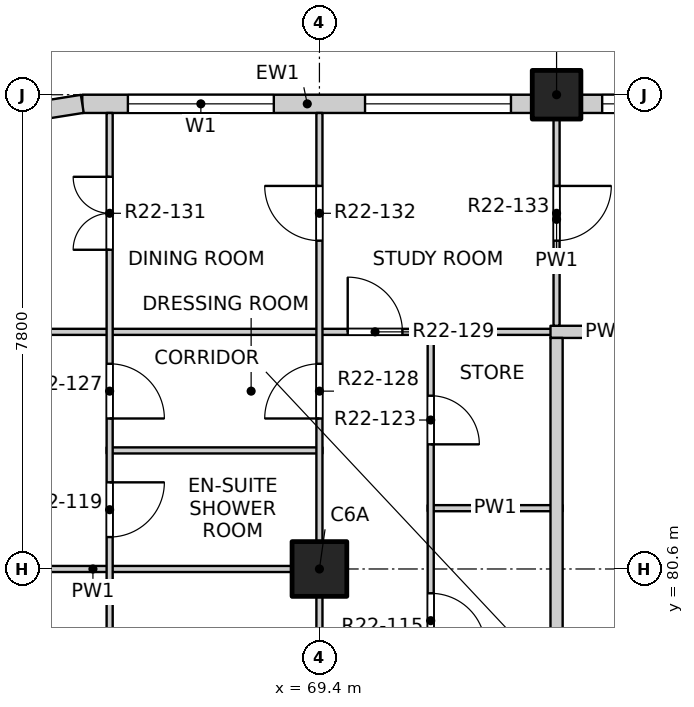
"""IFC4 building model, lengths in metres.
Left out: names, types, materials, properties, quantities, classifications, styles, units other than length and angle.
Written with IfcOpenShell. Run it as: python <this file> out.ifc"""

import sys

from ifc_helpers import new_model, si_unit, direction, frame, frame_2d, origin, origin_2d, place, context, subcontext, project, spatial, rectangle, extrude, element, fill, save


model = new_model("IFC4")
c1 = context("Model", 3, precision=1e-05, world=origin(), true_north=direction((0.0, 1.0)))
c2 = subcontext(c1, "Body", "Model", "MODEL_VIEW")
j1 = project(units=[si_unit("LENGTHUNIT", "METRE"), si_unit("PLANEANGLEUNIT", "RADIAN")], contexts=[c1])
p1 = place(None, origin())
s1 = spatial("IfcSite", under=j1, at=p1, CompositionType="ELEMENT")
p2 = place(p1, origin())
s2 = spatial("IfcBuilding", under=s1, at=p2, CompositionType="ELEMENT")
p3 = place(p2, frame((0.0, 0.0, 224.5)))
s3 = spatial("IfcBuildingStorey", under=s2, at=p3, CompositionType="ELEMENT", Elevation=224.5)
p4 = place(p3, frame((73.3, 88.4, -0.25), z_axis=(0.0, 0.0, 1.0), x_axis=(1.0, 0.0, 0.0)))
e1 = element("IfcColumn", 1, at=p4, inside=s3, PredefinedType="COLUMN", context=c2, shape_type="SweptSolid", body=[
    extrude(rectangle(XDim=0.8, YDim=0.8, at=origin_2d()), origin(), (0.0, 0.0, 1.0), 3.4),
])
p5 = place(p3, frame((69.4, 80.6, -0.25), z_axis=(0.0, 0.0, 1.0), x_axis=(1.0, 0.0, 0.0)))
e2 = element("IfcColumn", 2, at=p5, inside=s3, PredefinedType="COLUMN", context=c2, shape_type="SweptSolid", body=[
    extrude(rectangle(XDim=0.9, YDim=0.9, at=origin_2d()), origin(), (0.0, 0.0, 1.0), 3.4),
])
p6 = place(p3, frame((65.5, 88.25, 0.0), z_axis=(0.0, 0.0, 1.0), x_axis=(1.0, 0.0, 0.0)))
e3 = element("IfcWall", 3, at=p6, inside=s3, PredefinedType="SOLIDWALL", context=c2, shape_type="SweptSolid", body=[
    extrude(rectangle(XDim=7.4, YDim=0.3, at=frame_2d((3.7, 0.0))), origin(), (0.0, 0.0, 1.0), 2.7),
])
p7 = place(p6, frame((0.75, 0.0, 0.9)))
e4 = element("IfcOpeningElement", 4, at=p7, cuts=e3, PredefinedType="OPENING", context=c2, shape_type="SweptSolid", body=[
    extrude(rectangle(XDim=2.4, YDim=1.8, at=frame_2d((1.2, 0.9))), frame((0.0, 0.16, 0.0), z_axis=(0.0, -1.0, 0.0), x_axis=(1.0, 0.0, 0.0)), (0.0, 0.0, 1.0), 0.32),
])
p8 = place(p6, frame((4.65, 0.0, 0.9)))
e5 = element("IfcOpeningElement", 5, at=p8, cuts=e3, PredefinedType="OPENING", context=c2, shape_type="SweptSolid", body=[
    extrude(rectangle(XDim=2.4, YDim=1.8, at=frame_2d((1.2, 0.9))), frame((0.0, 0.16, 0.0), z_axis=(0.0, -1.0, 0.0), x_axis=(1.0, 0.0, 0.0)), (0.0, 0.0, 1.0), 0.32),
])
p9 = place(p3, frame((73.7, 88.25, 0.0), z_axis=(0.0, 0.0, 1.0), x_axis=(1.0, 0.0, 0.0)))
e6 = element("IfcWall", 6, at=p9, inside=s3, PredefinedType="SOLIDWALL", context=c2, shape_type="SweptSolid", body=[
    extrude(rectangle(XDim=22.6, YDim=0.3, at=frame_2d((11.3, 0.0))), origin(), (0.0, 0.0, 1.0), 2.7),
])
p10 = place(p9, frame((0.35, 0.0, 0.9)))
e7 = element("IfcOpeningElement", 7, at=p10, cuts=e6, PredefinedType="OPENING", context=c2, shape_type="SweptSolid", body=[
    extrude(rectangle(XDim=2.4, YDim=1.8, at=frame_2d((1.2, 0.9))), frame((0.0, 0.16, 0.0), z_axis=(0.0, -1.0, 0.0), x_axis=(1.0, 0.0, 0.0)), (0.0, 0.0, 1.0), 0.32),
])
p11 = place(p9, frame((4.25, 0.0, 0.9)))
e8 = element("IfcOpeningElement", 8, at=p11, cuts=e6, PredefinedType="OPENING", context=c2, shape_type="SweptSolid", body=[
    extrude(rectangle(XDim=2.4, YDim=1.8, at=frame_2d((1.2, 0.9))), frame((0.0, 0.16, 0.0), z_axis=(0.0, -1.0, 0.0), x_axis=(1.0, 0.0, 0.0)), (0.0, 0.0, 1.0), 0.32),
])
p12 = place(p9, frame((8.15, 0.0, 0.9)))
e9 = element("IfcOpeningElement", 9, at=p12, cuts=e6, PredefinedType="OPENING", context=c2, shape_type="SweptSolid", body=[
    extrude(rectangle(XDim=2.4, YDim=1.8, at=frame_2d((1.2, 0.9))), frame((0.0, 0.16, 0.0), z_axis=(0.0, -1.0, 0.0), x_axis=(1.0, 0.0, 0.0)), (0.0, 0.0, 1.0), 0.32),
])
p13 = place(p9, frame((12.05, 0.0, 0.9)))
e10 = element("IfcOpeningElement", 10, at=p13, cuts=e6, PredefinedType="OPENING", context=c2, shape_type="SweptSolid", body=[
    extrude(rectangle(XDim=2.4, YDim=1.8, at=frame_2d((1.2, 0.9))), frame((0.0, 0.16, 0.0), z_axis=(0.0, -1.0, 0.0), x_axis=(1.0, 0.0, 0.0)), (0.0, 0.0, 1.0), 0.32),
])
p14 = place(p9, frame((15.95, 0.0, 0.9)))
e11 = element("IfcOpeningElement", 11, at=p14, cuts=e6, PredefinedType="OPENING", context=c2, shape_type="SweptSolid", body=[
    extrude(rectangle(XDim=2.4, YDim=1.8, at=frame_2d((1.2, 0.9))), frame((0.0, 0.16, 0.0), z_axis=(0.0, -1.0, 0.0), x_axis=(1.0, 0.0, 0.0)), (0.0, 0.0, 1.0), 0.32),
])
p15 = place(p9, frame((19.85, 0.0, 0.9)))
e12 = element("IfcOpeningElement", 12, at=p15, cuts=e6, PredefinedType="OPENING", context=c2, shape_type="SweptSolid", body=[
    extrude(rectangle(XDim=2.4, YDim=1.8, at=frame_2d((1.2, 0.9))), frame((0.0, 0.16, 0.0), z_axis=(0.0, -1.0, 0.0), x_axis=(1.0, 0.0, 0.0)), (0.0, 0.0, 1.0), 0.32),
])
p16 = place(p3, frame((65.5, 88.25, 0.0), z_axis=(0.0, 0.0, 1.0), x_axis=(-0.987678452879, -0.156496880861, 0.0)))
e13 = element("IfcWall", 13, at=p16, inside=s3, PredefinedType="SOLIDWALL", context=c2, shape_type="SweptSolid", body=[
    extrude(rectangle(XDim=1.173, YDim=0.3, at=frame_2d((0.586, 0.0))), origin(), (0.0, 0.0, 1.0), 2.7),
])
p17 = place(p3, frame((61.9, 80.6, 0.0), z_axis=(0.0, 0.0, 1.0), x_axis=(1.0, 0.0, 0.0)))
e14 = element("IfcWall", 14, at=p17, inside=s3, PredefinedType="PARTITIONING", context=c2, shape_type="SweptSolid", body=[
    extrude(rectangle(XDim=7.55, YDim=0.1, at=frame_2d((3.775, 0.0))), origin(), (0.0, 0.0, 1.0), 3.15),
])
p18 = place(p3, frame((71.18, 81.6, 0.0), z_axis=(0.0, 0.0, 1.0), x_axis=(1.0, 0.0, 0.0)))
e15 = element("IfcWall", 15, at=p18, inside=s3, PredefinedType="PARTITIONING", context=c2, shape_type="SweptSolid", body=[
    extrude(rectangle(XDim=2.22, YDim=0.1, at=frame_2d((1.11, 0.0))), origin(), (0.0, 0.0, 1.0), 3.15),
])
p19 = place(p3, frame((65.9, 82.55, 0.0), z_axis=(0.0, 0.0, 1.0), x_axis=(1.0, 0.0, 0.0)))
e16 = element("IfcWall", 16, at=p19, inside=s3, PredefinedType="PARTITIONING", context=c2, shape_type="SweptSolid", body=[
    extrude(rectangle(XDim=3.55, YDim=0.1, at=frame_2d((1.775, 0.0))), origin(), (0.0, 0.0, 1.0), 3.15),
])
p20 = place(p3, frame((61.9, 84.5, 0.0), z_axis=(0.0, 0.0, 1.0), x_axis=(1.0, 0.0, 0.0)))
e17 = element("IfcWall", 17, at=p20, inside=s3, PredefinedType="PARTITIONING", context=c2, shape_type="SweptSolid", body=[
    extrude(rectangle(XDim=11.5, YDim=0.1, at=frame_2d((5.75, 0.0))), origin(), (0.0, 0.0, 1.0), 3.15),
])
p21 = place(p20, frame((7.965, 0.0, 0.0)))
e18 = element("IfcOpeningElement", 18, at=p21, cuts=e17, PredefinedType="OPENING", context=c2, shape_type="SweptSolid", body=[
    extrude(rectangle(XDim=0.9, YDim=2.1, at=frame_2d((0.45, 1.05))), frame((0.0, 0.06, 0.0), z_axis=(0.0, -1.0, 0.0), x_axis=(1.0, 0.0, 0.0)), (0.0, 0.0, 1.0), 0.12),
])
p22 = place(p3, frame((73.2, 84.5, 0.0), z_axis=(0.0, 0.0, 1.0), x_axis=(1.0, 0.0, 0.0)))
e19 = element("IfcWall", 19, at=p22, inside=s3, PredefinedType="PARTITIONING", context=c2, shape_type="SweptSolid", body=[
    extrude(rectangle(XDim=1.85, YDim=0.2, at=frame_2d((0.925, 0.0))), origin(), (0.0, 0.0, 1.0), 3.15),
])
p23 = place(p3, frame((65.95, 72.9, 0.0), z_axis=(0.0, 0.0, 1.0), x_axis=(0.0, 1.0, 0.0)))
e20 = element("IfcWall", 20, at=p23, inside=s3, PredefinedType="PARTITIONING", context=c2, shape_type="SweptSolid", body=[
    extrude(rectangle(XDim=15.2, YDim=0.1, at=frame_2d((7.6, 0.0))), origin(), (0.0, 0.0, 1.0), 3.15),
])
p24 = place(p23, frame((0.425, 0.0, 0.0)))
e21 = element("IfcOpeningElement", 21, at=p24, cuts=e20, PredefinedType="OPENING", context=c2, shape_type="SweptSolid", body=[
    extrude(rectangle(XDim=0.9, YDim=2.1, at=frame_2d((0.45, 1.05))), frame((0.0, 0.06, 0.0), z_axis=(0.0, -1.0, 0.0), x_axis=(1.0, 0.0, 0.0)), (0.0, 0.0, 1.0), 0.12),
])
p25 = place(p23, frame((2.375, 0.0, 0.0)))
e22 = element("IfcOpeningElement", 22, at=p25, cuts=e20, PredefinedType="OPENING", context=c2, shape_type="SweptSolid", body=[
    extrude(rectangle(XDim=0.9, YDim=2.1, at=frame_2d((0.45, 1.05))), frame((0.0, 0.06, 0.0), z_axis=(0.0, -1.0, 0.0), x_axis=(1.0, 0.0, 0.0)), (0.0, 0.0, 1.0), 0.12),
])
p26 = place(p23, frame((5.15, 0.0, 0.0)))
e23 = element("IfcOpeningElement", 23, at=p26, cuts=e20, PredefinedType="OPENING", context=c2, shape_type="SweptSolid", body=[
    extrude(rectangle(XDim=1.2, YDim=2.1, at=frame_2d((0.6, 1.05))), frame((0.0, 0.06, 0.0), z_axis=(0.0, -1.0, 0.0), x_axis=(1.0, 0.0, 0.0)), (0.0, 0.0, 1.0), 0.12),
])
p27 = place(p23, frame((8.225, 0.0, 0.0)))
e24 = element("IfcOpeningElement", 24, at=p27, cuts=e20, PredefinedType="OPENING", context=c2, shape_type="SweptSolid", body=[
    extrude(rectangle(XDim=0.9, YDim=2.1, at=frame_2d((0.45, 1.05))), frame((0.0, 0.06, 0.0), z_axis=(0.0, -1.0, 0.0), x_axis=(1.0, 0.0, 0.0)), (0.0, 0.0, 1.0), 0.12),
])
p28 = place(p23, frame((10.175, 0.0, 0.0)))
e25 = element("IfcOpeningElement", 25, at=p28, cuts=e20, PredefinedType="OPENING", context=c2, shape_type="SweptSolid", body=[
    extrude(rectangle(XDim=0.9, YDim=2.1, at=frame_2d((0.45, 1.05))), frame((0.0, 0.06, 0.0), z_axis=(0.0, -1.0, 0.0), x_axis=(1.0, 0.0, 0.0)), (0.0, 0.0, 1.0), 0.12),
])
p29 = place(p23, frame((12.95, 0.0, 0.0)))
e26 = element("IfcOpeningElement", 26, at=p29, cuts=e20, PredefinedType="OPENING", context=c2, shape_type="SweptSolid", body=[
    extrude(rectangle(XDim=1.2, YDim=2.1, at=frame_2d((0.6, 1.05))), frame((0.0, 0.06, 0.0), z_axis=(0.0, -1.0, 0.0), x_axis=(1.0, 0.0, 0.0)), (0.0, 0.0, 1.0), 0.12),
])
p30 = place(p3, frame((69.4, 41.9, 0.0), z_axis=(0.0, 0.0, 1.0), x_axis=(0.0, 1.0, 0.0)))
e27 = element("IfcWall", 27, at=p30, inside=s3, PredefinedType="PARTITIONING", context=c2, shape_type="SweptSolid", body=[
    extrude(rectangle(XDim=46.2, YDim=0.1, at=frame_2d((23.1, 0.0))), origin(), (0.0, 0.0, 1.0), 3.15),
])
p31 = place(p30, frame((1.2, 0.0, 0.0)))
e28 = element("IfcOpeningElement", 28, at=p31, cuts=e27, PredefinedType="OPENING", context=c2, shape_type="SweptSolid", body=[
    extrude(rectangle(XDim=0.9, YDim=2.1, at=frame_2d((0.45, 1.05))), frame((0.0, 0.06, 0.0), z_axis=(0.0, -1.0, 0.0), x_axis=(1.0, 0.0, 0.0)), (0.0, 0.0, 1.0), 0.12),
])
p32 = place(p30, frame((5.1, 0.0, 0.0)))
e29 = element("IfcOpeningElement", 29, at=p32, cuts=e27, PredefinedType="OPENING", context=c2, shape_type="SweptSolid", body=[
    extrude(rectangle(XDim=0.9, YDim=2.1, at=frame_2d((0.45, 1.05))), frame((0.0, 0.06, 0.0), z_axis=(0.0, -1.0, 0.0), x_axis=(1.0, 0.0, 0.0)), (0.0, 0.0, 1.0), 0.12),
])
p33 = place(p30, frame((9.0, 0.0, 0.0)))
e30 = element("IfcOpeningElement", 30, at=p33, cuts=e27, PredefinedType="OPENING", context=c2, shape_type="SweptSolid", body=[
    extrude(rectangle(XDim=0.9, YDim=2.1, at=frame_2d((0.45, 1.05))), frame((0.0, 0.06, 0.0), z_axis=(0.0, -1.0, 0.0), x_axis=(1.0, 0.0, 0.0)), (0.0, 0.0, 1.0), 0.12),
])
p34 = place(p30, frame((13.85, 0.0, 0.0)))
e31 = element("IfcOpeningElement", 31, at=p34, cuts=e27, PredefinedType="OPENING", context=c2, shape_type="SweptSolid", body=[
    extrude(rectangle(XDim=0.9, YDim=2.1, at=frame_2d((0.45, 1.05))), frame((0.0, 0.06, 0.0), z_axis=(0.0, -1.0, 0.0), x_axis=(1.0, 0.0, 0.0)), (0.0, 0.0, 1.0), 0.12),
])
p35 = place(p30, frame((17.775, 0.0, 0.0)))
e32 = element("IfcOpeningElement", 32, at=p35, cuts=e27, PredefinedType="OPENING", context=c2, shape_type="SweptSolid", body=[
    extrude(rectangle(XDim=0.9, YDim=2.1, at=frame_2d((0.45, 1.05))), frame((0.0, 0.06, 0.0), z_axis=(0.0, -1.0, 0.0), x_axis=(1.0, 0.0, 0.0)), (0.0, 0.0, 1.0), 0.12),
])
p36 = place(p30, frame((21.625, 0.0, 0.0)))
e33 = element("IfcOpeningElement", 33, at=p36, cuts=e27, PredefinedType="OPENING", context=c2, shape_type="SweptSolid", body=[
    extrude(rectangle(XDim=0.9, YDim=2.1, at=frame_2d((0.45, 1.05))), frame((0.0, 0.06, 0.0), z_axis=(0.0, -1.0, 0.0), x_axis=(1.0, 0.0, 0.0)), (0.0, 0.0, 1.0), 0.12),
])
p37 = place(p30, frame((24.6, 0.0, 0.0)))
e34 = element("IfcOpeningElement", 34, at=p37, cuts=e27, PredefinedType="OPENING", context=c2, shape_type="SweptSolid", body=[
    extrude(rectangle(XDim=0.9, YDim=2.1, at=frame_2d((0.45, 1.05))), frame((0.0, 0.06, 0.0), z_axis=(0.0, -1.0, 0.0), x_axis=(1.0, 0.0, 0.0)), (0.0, 0.0, 1.0), 0.12),
])
p38 = place(p30, frame((29.425, 0.0, 0.0)))
e35 = element("IfcOpeningElement", 35, at=p38, cuts=e27, PredefinedType="OPENING", context=c2, shape_type="SweptSolid", body=[
    extrude(rectangle(XDim=0.9, YDim=2.1, at=frame_2d((0.45, 1.05))), frame((0.0, 0.06, 0.0), z_axis=(0.0, -1.0, 0.0), x_axis=(1.0, 0.0, 0.0)), (0.0, 0.0, 1.0), 0.12),
])
p39 = place(p30, frame((33.375, 0.0, 0.0)))
e36 = element("IfcOpeningElement", 36, at=p39, cuts=e27, PredefinedType="OPENING", context=c2, shape_type="SweptSolid", body=[
    extrude(rectangle(XDim=0.9, YDim=2.1, at=frame_2d((0.45, 1.05))), frame((0.0, 0.06, 0.0), z_axis=(0.0, -1.0, 0.0), x_axis=(1.0, 0.0, 0.0)), (0.0, 0.0, 1.0), 0.12),
])
p40 = place(p30, frame((36.3, 0.0, 0.0)))
e37 = element("IfcOpeningElement", 37, at=p40, cuts=e27, PredefinedType="OPENING", context=c2, shape_type="SweptSolid", body=[
    extrude(rectangle(XDim=0.9, YDim=2.1, at=frame_2d((0.45, 1.05))), frame((0.0, 0.06, 0.0), z_axis=(0.0, -1.0, 0.0), x_axis=(1.0, 0.0, 0.0)), (0.0, 0.0, 1.0), 0.12),
])
p41 = place(p30, frame((41.175, 0.0, 0.0)))
e38 = element("IfcOpeningElement", 38, at=p41, cuts=e27, PredefinedType="OPENING", context=c2, shape_type="SweptSolid", body=[
    extrude(rectangle(XDim=0.9, YDim=2.1, at=frame_2d((0.45, 1.05))), frame((0.0, 0.06, 0.0), z_axis=(0.0, -1.0, 0.0), x_axis=(1.0, 0.0, 0.0)), (0.0, 0.0, 1.0), 0.12),
])
p42 = place(p30, frame((44.1, 0.0, 0.0)))
e39 = element("IfcOpeningElement", 39, at=p42, cuts=e27, PredefinedType="OPENING", context=c2, shape_type="SweptSolid", body=[
    extrude(rectangle(XDim=0.9, YDim=2.1, at=frame_2d((0.45, 1.05))), frame((0.0, 0.06, 0.0), z_axis=(0.0, -1.0, 0.0), x_axis=(1.0, 0.0, 0.0)), (0.0, 0.0, 1.0), 0.12),
])
p43 = place(p3, frame((71.23, 75.55, 0.0), z_axis=(0.0, 0.0, 1.0), x_axis=(0.0, 1.0, 0.0)))
e40 = element("IfcWall", 40, at=p43, inside=s3, PredefinedType="PARTITIONING", context=c2, shape_type="SweptSolid", body=[
    extrude(rectangle(XDim=8.9, YDim=0.1, at=frame_2d((4.45, 0.0))), origin(), (0.0, 0.0, 1.0), 3.15),
])
p44 = place(p43, frame((0.7, 0.0, 0.0)))
e41 = element("IfcOpeningElement", 41, at=p44, cuts=e40, PredefinedType="OPENING", context=c2, shape_type="SweptSolid", body=[
    extrude(rectangle(XDim=0.9, YDim=2.1, at=frame_2d((0.45, 1.05))), frame((0.0, 0.06, 0.0), z_axis=(0.0, -1.0, 0.0), x_axis=(1.0, 0.0, 0.0)), (0.0, 0.0, 1.0), 0.12),
])
p45 = place(p43, frame((3.75, 0.0, 0.0)))
e42 = element("IfcOpeningElement", 42, at=p45, cuts=e40, PredefinedType="OPENING", context=c2, shape_type="SweptSolid", body=[
    extrude(rectangle(XDim=0.9, YDim=2.1, at=frame_2d((0.45, 1.05))), frame((0.0, 0.06, 0.0), z_axis=(0.0, -1.0, 0.0), x_axis=(1.0, 0.0, 0.0)), (0.0, 0.0, 1.0), 0.12),
])
p46 = place(p43, frame((7.1, 0.0, 0.0)))
e43 = element("IfcOpeningElement", 43, at=p46, cuts=e40, PredefinedType="OPENING", context=c2, shape_type="SweptSolid", body=[
    extrude(rectangle(XDim=0.8, YDim=2.1, at=frame_2d((0.4, 1.05))), frame((0.0, 0.06, 0.0), z_axis=(0.0, -1.0, 0.0), x_axis=(1.0, 0.0, 0.0)), (0.0, 0.0, 1.0), 0.12),
])
p47 = place(p3, frame((73.3, 49.5, 0.0), z_axis=(0.0, 0.0, 1.0), x_axis=(0.0, 1.0, 0.0)))
e44 = element("IfcWall", 44, at=p47, inside=s3, PredefinedType="PARTITIONING", context=c2, shape_type="SweptSolid", body=[
    extrude(rectangle(XDim=34.9, YDim=0.2, at=frame_2d((17.45, 0.0))), origin(), (0.0, 0.0, 1.0), 3.15),
])
p48 = place(p47, frame((3.575, 0.0, 0.0)))
e45 = element("IfcOpeningElement", 45, at=p48, cuts=e44, PredefinedType="OPENING", context=c2, shape_type="SweptSolid", body=[
    extrude(rectangle(XDim=1.0, YDim=2.1, at=frame_2d((0.5, 1.05))), frame((0.0, 0.11, 0.0), z_axis=(0.0, -1.0, 0.0), x_axis=(1.0, 0.0, 0.0)), (0.0, 0.0, 1.0), 0.22),
])
p49 = place(p47, frame((18.075, 0.0, 0.0)))
e46 = element("IfcOpeningElement", 46, at=p49, cuts=e44, PredefinedType="OPENING", context=c2, shape_type="SweptSolid", body=[
    extrude(rectangle(XDim=1.0, YDim=2.1, at=frame_2d((0.5, 1.05))), frame((0.0, 0.11, 0.0), z_axis=(0.0, -1.0, 0.0), x_axis=(1.0, 0.0, 0.0)), (0.0, 0.0, 1.0), 0.22),
])
p50 = place(p47, frame((26.175, 0.0, 0.0)))
e47 = element("IfcOpeningElement", 47, at=p50, cuts=e44, PredefinedType="OPENING", context=c2, shape_type="SweptSolid", body=[
    extrude(rectangle(XDim=1.0, YDim=2.1, at=frame_2d((0.5, 1.05))), frame((0.0, 0.11, 0.0), z_axis=(0.0, -1.0, 0.0), x_axis=(1.0, 0.0, 0.0)), (0.0, 0.0, 1.0), 0.22),
])
p51 = place(p3, frame((73.3, 84.6, 0.0), z_axis=(0.0, 0.0, 1.0), x_axis=(0.0, 1.0, 0.0)))
e48 = element("IfcWall", 48, at=p51, inside=s3, PredefinedType="PARTITIONING", context=c2, shape_type="SweptSolid", body=[
    extrude(rectangle(XDim=3.5, YDim=0.1, at=frame_2d((1.75, 0.0))), origin(), (0.0, 0.0, 1.0), 3.15),
])
p52 = place(p51, frame((1.4, 0.0, 0.0)))
e49 = element("IfcOpeningElement", 49, at=p52, cuts=e48, PredefinedType="OPENING", context=c2, shape_type="SweptSolid", body=[
    extrude(rectangle(XDim=0.9, YDim=2.1, at=frame_2d((0.45, 1.05))), frame((0.0, 0.06, 0.0), z_axis=(0.0, -1.0, 0.0), x_axis=(1.0, 0.0, 0.0)), (0.0, 0.0, 1.0), 0.12),
])
p53 = place(p7, origin())
e50 = element("IfcWindow", 50, at=p53, inside=s3, PartitioningType="DOUBLE_PANEL_VERTICAL", PredefinedType="WINDOW", context=c2, shape_type="SweptSolid", body=[
    extrude(rectangle(XDim=2.4, YDim=1.8, at=frame_2d((1.2, 0.9))), frame((0.0, 0.03, 0.0), z_axis=(0.0, -1.0, 0.0), x_axis=(1.0, 0.0, 0.0)), (0.0, 0.0, 1.0), 0.06),
])
fill(e4, e50)
p54 = place(p8, origin())
e51 = element("IfcWindow", 51, at=p54, inside=s3, PartitioningType="DOUBLE_PANEL_VERTICAL", PredefinedType="WINDOW", context=c2, shape_type="SweptSolid", body=[
    extrude(rectangle(XDim=2.4, YDim=1.8, at=frame_2d((1.2, 0.9))), frame((0.0, 0.03, 0.0), z_axis=(0.0, -1.0, 0.0), x_axis=(1.0, 0.0, 0.0)), (0.0, 0.0, 1.0), 0.06),
])
fill(e5, e51)
p55 = place(p10, origin())
e52 = element("IfcWindow", 52, at=p55, inside=s3, PartitioningType="DOUBLE_PANEL_VERTICAL", PredefinedType="WINDOW", context=c2, shape_type="SweptSolid", body=[
    extrude(rectangle(XDim=2.4, YDim=1.8, at=frame_2d((1.2, 0.9))), frame((0.0, 0.03, 0.0), z_axis=(0.0, -1.0, 0.0), x_axis=(1.0, 0.0, 0.0)), (0.0, 0.0, 1.0), 0.06),
])
fill(e7, e52)
p56 = place(p45, origin())
e53 = element("IfcDoor", 53, at=p56, inside=s3, OperationType="SINGLE_SWING_RIGHT", PredefinedType="DOOR", context=c2, shape_type="SweptSolid", body=[
    extrude(rectangle(XDim=0.9, YDim=2.1, at=frame_2d((0.45, 1.05))), frame((0.0, 0.025, 0.0), z_axis=(0.0, -1.0, 0.0), x_axis=(1.0, 0.0, 0.0)), (0.0, 0.0, 1.0), 0.05),
])
fill(e42, e53)
p57 = place(p27, origin())
e54 = element("IfcDoor", 54, at=p57, inside=s3, OperationType="SINGLE_SWING_LEFT", PredefinedType="DOOR", context=c2, shape_type="SweptSolid", body=[
    extrude(rectangle(XDim=0.9, YDim=2.1, at=frame_2d((0.45, 1.05))), frame((0.0, 0.025, 0.0), z_axis=(0.0, -1.0, 0.0), x_axis=(1.0, 0.0, 0.0)), (0.0, 0.0, 1.0), 0.05),
])
fill(e24, e54)
p58 = place(p46, origin())
e55 = element("IfcDoor", 55, at=p58, inside=s3, OperationType="SINGLE_SWING_RIGHT", PredefinedType="DOOR", context=c2, shape_type="SweptSolid", body=[
    extrude(rectangle(XDim=0.8, YDim=2.1, at=frame_2d((0.4, 1.05))), frame((0.0, 0.025, 0.0), z_axis=(0.0, -1.0, 0.0), x_axis=(1.0, 0.0, 0.0)), (0.0, 0.0, 1.0), 0.05),
])
fill(e43, e55)
p59 = place(p28, origin())
e56 = element("IfcDoor", 56, at=p59, inside=s3, OperationType="SINGLE_SWING_RIGHT", PredefinedType="DOOR", context=c2, shape_type="SweptSolid", body=[
    extrude(rectangle(XDim=0.9, YDim=2.1, at=frame_2d((0.45, 1.05))), frame((0.0, 0.025, 0.0), z_axis=(0.0, -1.0, 0.0), x_axis=(1.0, 0.0, 0.0)), (0.0, 0.0, 1.0), 0.05),
])
fill(e25, e56)
p60 = place(p41, origin())
e57 = element("IfcDoor", 57, at=p60, inside=s3, OperationType="SINGLE_SWING_LEFT", PredefinedType="DOOR", context=c2, shape_type="SweptSolid", body=[
    extrude(rectangle(XDim=0.9, YDim=2.1, at=frame_2d((0.45, 1.05))), frame((0.0, 0.025, 0.0), z_axis=(0.0, -1.0, 0.0), x_axis=(1.0, 0.0, 0.0)), (0.0, 0.0, 1.0), 0.05),
])
fill(e38, e57)
p61 = place(p21, origin())
e58 = element("IfcDoor", 58, at=p61, inside=s3, OperationType="SINGLE_SWING_LEFT", PredefinedType="DOOR", context=c2, shape_type="SweptSolid", body=[
    extrude(rectangle(XDim=0.9, YDim=2.1, at=frame_2d((0.45, 1.05))), frame((0.0, 0.025, 0.0), z_axis=(0.0, -1.0, 0.0), x_axis=(1.0, 0.0, 0.0)), (0.0, 0.0, 1.0), 0.05),
])
fill(e18, e58)
p62 = place(p29, origin())
e59 = element("IfcDoor", 59, at=p62, inside=s3, OperationType="DOUBLE_DOOR_SINGLE_SWING", PredefinedType="DOOR", context=c2, shape_type="SweptSolid", body=[
    extrude(rectangle(XDim=1.2, YDim=2.1, at=frame_2d((0.6, 1.05))), frame((0.0, 0.025, 0.0), z_axis=(0.0, -1.0, 0.0), x_axis=(1.0, 0.0, 0.0)), (0.0, 0.0, 1.0), 0.05),
])
fill(e26, e59)
p63 = place(p42, origin())
e60 = element("IfcDoor", 60, at=p63, inside=s3, OperationType="SINGLE_SWING_RIGHT", PredefinedType="DOOR", context=c2, shape_type="SweptSolid", body=[
    extrude(rectangle(XDim=0.9, YDim=2.1, at=frame_2d((0.45, 1.05))), frame((0.0, 0.025, 0.0), z_axis=(0.0, -1.0, 0.0), x_axis=(1.0, 0.0, 0.0)), (0.0, 0.0, 1.0), 0.05),
])
fill(e39, e60)
p64 = place(p52, origin())
e61 = element("IfcDoor", 61, at=p64, inside=s3, OperationType="SINGLE_SWING_LEFT", PredefinedType="DOOR", context=c2, shape_type="SweptSolid", body=[
    extrude(rectangle(XDim=0.9, YDim=2.1, at=frame_2d((0.45, 1.05))), frame((0.0, 0.025, 0.0), z_axis=(0.0, -1.0, 0.0), x_axis=(1.0, 0.0, 0.0)), (0.0, 0.0, 1.0), 0.05),
])
fill(e49, e61)
save(model, sys.argv[1])
